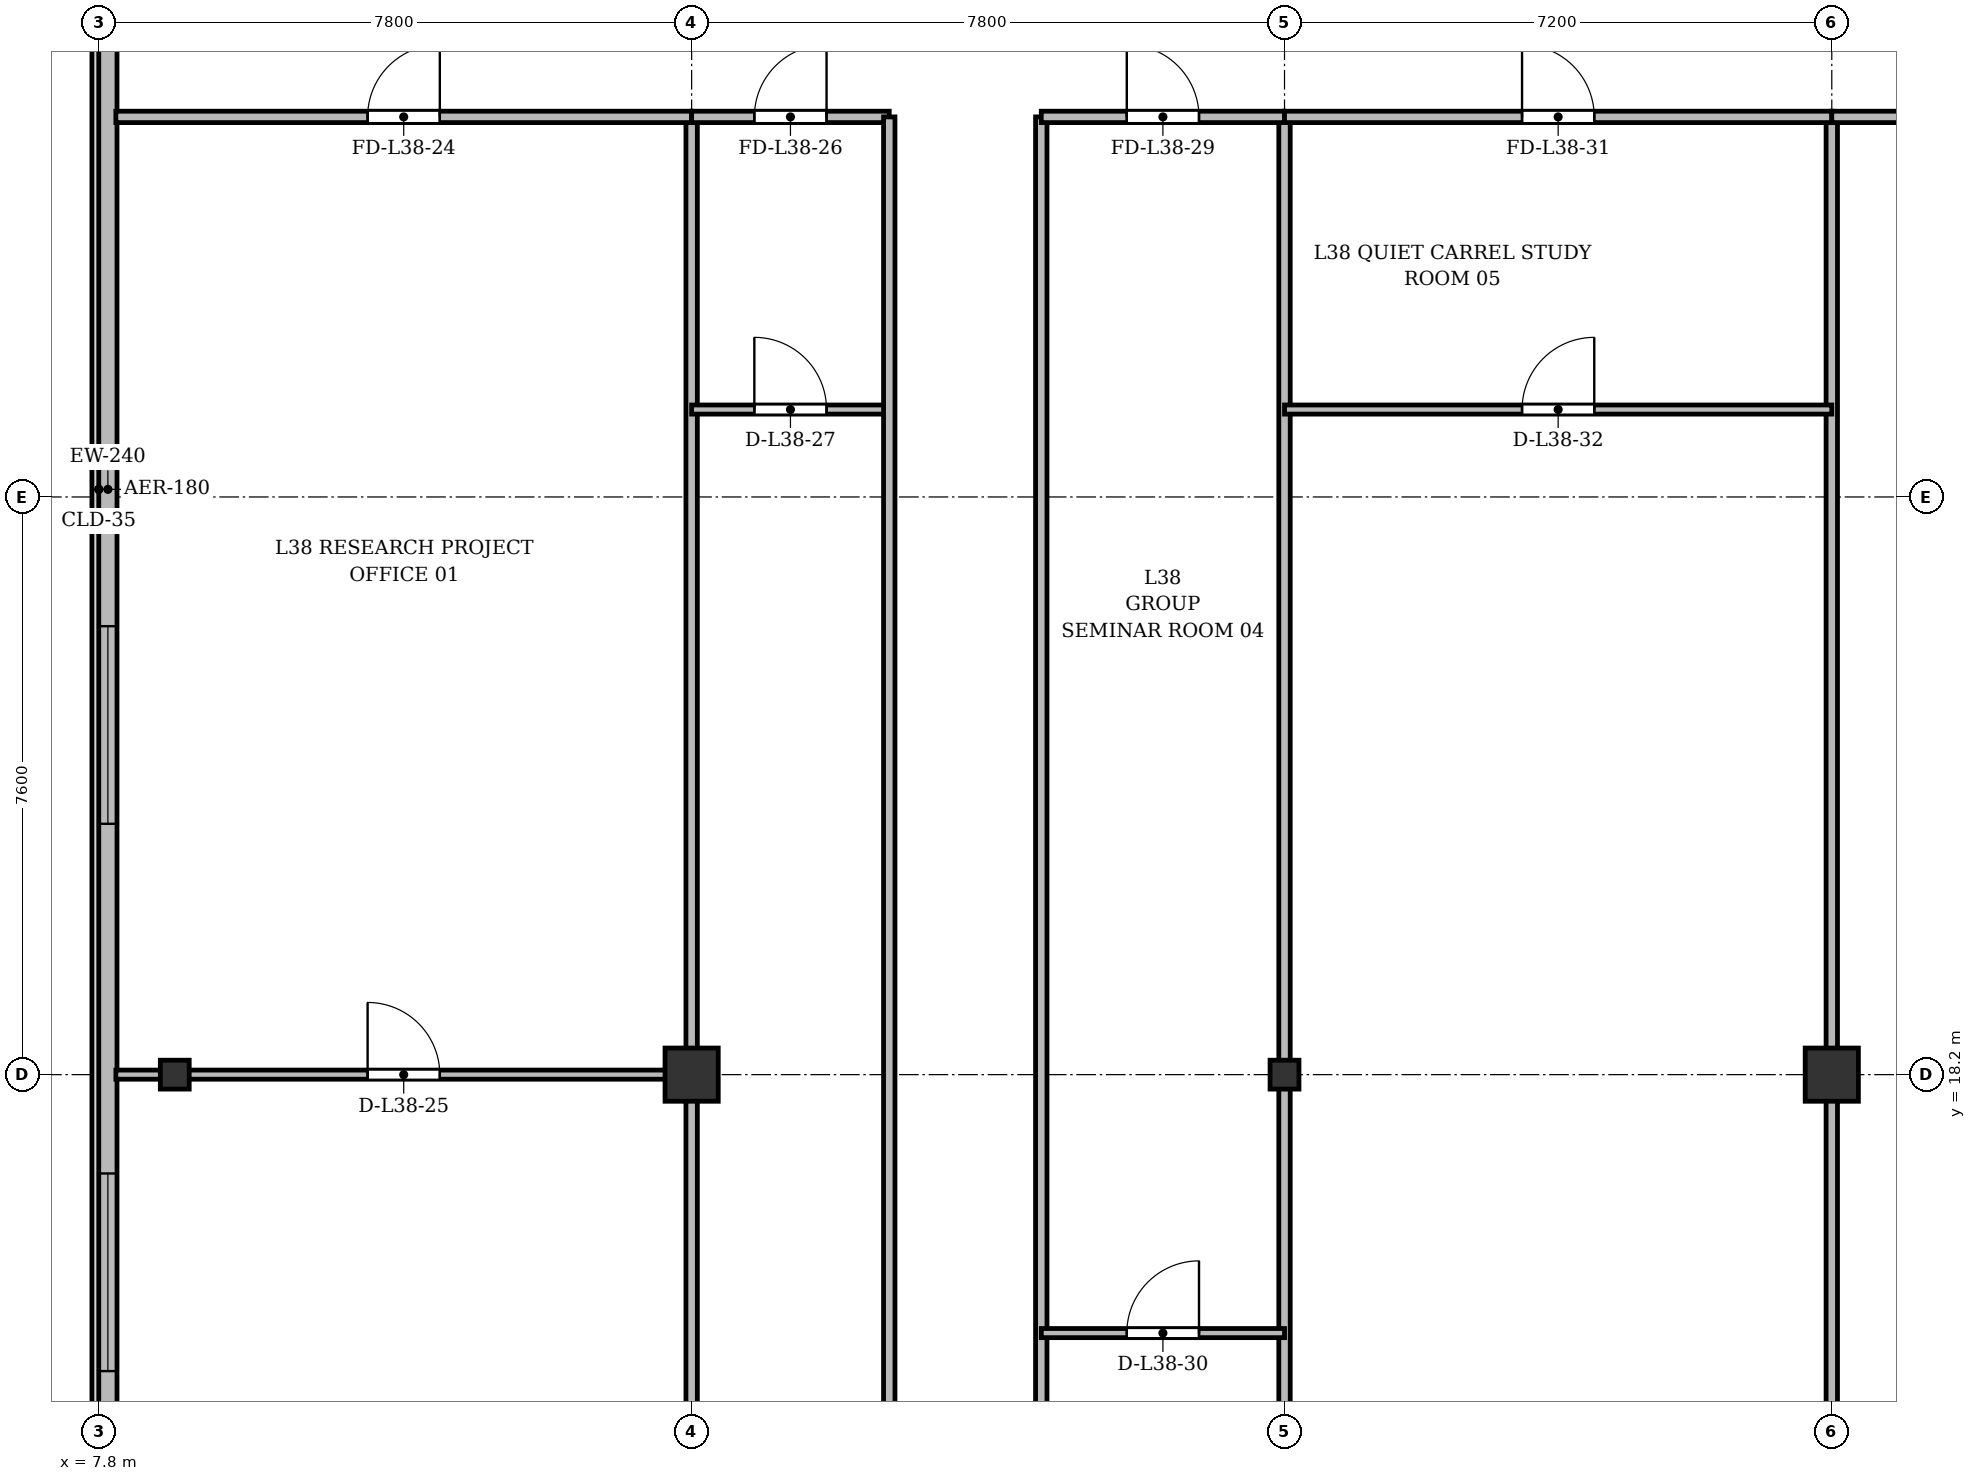
"""IFC4 building model, lengths in metres.
Left out: names, types, materials, properties, quantities, classifications, styles, units other than length and angle.
Written with IfcOpenShell. Run it as: python <this file> out.ifc"""

import sys

from ifc_helpers import new_model, si_unit, direction, frame, frame_2d, origin, origin_2d, place, context, subcontext, project, spatial, rectangle, i_section, extrude, source, transform, mapped, element, fill, save


model = new_model("IFC4")
c1 = context("Model", 3, precision=1e-05, world=origin(), true_north=direction((0.0, 1.0)))
c2 = subcontext(c1, "Body", "Model", "MODEL_VIEW")
j1 = project(units=[si_unit("LENGTHUNIT", "METRE"), si_unit("PLANEANGLEUNIT", "RADIAN")], contexts=[c1])
p1 = place(None, origin())
s1 = spatial("IfcSite", under=j1, at=p1, CompositionType="ELEMENT")
p2 = place(p1, origin())
s2 = spatial("IfcBuilding", under=s1, at=p2, CompositionType="ELEMENT")
p3 = place(p2, frame((0.0, 0.0, 146.5)))
s3 = spatial("IfcBuildingStorey", under=s2, at=p3, CompositionType="ELEMENT", Elevation=146.5)
m1 = source(origin(), c2, "Body", "SweptSolid", [
    extrude(i_section(OverallWidth=0.38, OverallDepth=0.38, WebThickness=0.02, FlangeThickness=0.03, at=origin_2d()), origin(), (0.0, 0.0, 1.0), 3.6),
])
p4 = place(p3, frame((8.8, 18.2, 0.0), z_axis=(0.0, 0.0, 1.0), x_axis=(1.0, 0.0, 0.0)))
e1 = element("IfcColumn", 1, at=p4, inside=s3, PredefinedType="COLUMN", context=c2, shape_type="MappedRepresentation", body=[
    mapped(m1, transform((0.0, 0.0, 0.0), x_axis=(1.0, 0.0, 0.0), y_axis=(0.0, 1.0, 0.0), z_axis=(0.0, 0.0, 1.0), scale=1.0)),
])
m2 = source(origin(), c2, "Body", "SweptSolid", [
    extrude(rectangle(XDim=0.7, YDim=0.7, at=origin_2d()), origin(), (0.0, 0.0, 1.0), 3.6),
])
p5 = place(p3, frame((15.6, 18.2, 0.0), z_axis=(0.0, 0.0, 1.0), x_axis=(1.0, 0.0, 0.0)))
e2 = element("IfcColumn", 2, at=p5, inside=s3, PredefinedType="COLUMN", context=c2, shape_type="MappedRepresentation", body=[
    mapped(m2, transform((0.0, 0.0, 0.0), x_axis=(1.0, 0.0, 0.0), y_axis=(0.0, 1.0, 0.0), z_axis=(0.0, 0.0, 1.0), scale=1.0)),
])
p6 = place(p3, frame((23.4, 18.2, 0.0), z_axis=(0.0, 0.0, 1.0), x_axis=(1.0, 0.0, 0.0)))
e3 = element("IfcColumn", 3, at=p6, inside=s3, PredefinedType="COLUMN", context=c2, shape_type="MappedRepresentation", body=[
    mapped(m1, transform((0.0, 0.0, 0.0), x_axis=(1.0, 0.0, 0.0), y_axis=(0.0, 1.0, 0.0), z_axis=(0.0, 0.0, 1.0), scale=1.0)),
])
p7 = place(p3, frame((30.6, 18.2, 0.0), z_axis=(0.0, 0.0, 1.0), x_axis=(1.0, 0.0, 0.0)))
e4 = element("IfcColumn", 4, at=p7, inside=s3, PredefinedType="COLUMN", context=c2, shape_type="MappedRepresentation", body=[
    mapped(m2, transform((0.0, 0.0, 0.0), x_axis=(1.0, 0.0, 0.0), y_axis=(0.0, 1.0, 0.0), z_axis=(0.0, 0.0, 1.0), scale=1.0)),
])
p8 = place(p3, frame((7.92, 6.3, 0.0), z_axis=(0.0, 0.0, 1.0), x_axis=(0.0, 1.0, 0.0)))
e5 = element("IfcWall", 5, at=p8, inside=s3, PredefinedType="SOLIDWALL", context=c2, shape_type="SweptSolid", body=[
    extrude(rectangle(XDim=39.2, YDim=0.24, at=frame_2d((19.6, 0.0))), origin(), (0.0, 0.0, 1.0), 3.35),
])
p9 = place(p8, frame((1.45, 0.0, 0.92)))
e6 = element("IfcOpeningElement", 6, at=p9, cuts=e5, PredefinedType="OPENING", context=c2, shape_type="SweptSolid", body=[
    extrude(rectangle(XDim=1.2, YDim=1.65, at=frame_2d((0.6, 0.825))), frame((0.0, 0.13, 0.0), z_axis=(0.0, -1.0, 0.0), x_axis=(1.0, 0.0, 0.0)), (0.0, 0.0, 1.0), 0.26),
])
p10 = place(p8, frame((3.8, 0.0, 0.92)))
e7 = element("IfcOpeningElement", 7, at=p10, cuts=e5, PredefinedType="OPENING", context=c2, shape_type="SweptSolid", body=[
    extrude(rectangle(XDim=2.6, YDim=1.9, at=frame_2d((1.3, 0.95))), frame((0.0, 0.13, 0.0), z_axis=(0.0, -1.0, 0.0), x_axis=(1.0, 0.0, 0.0)), (0.0, 0.0, 1.0), 0.26),
])
p11 = place(p8, frame((8.0, 0.0, 0.92)))
e8 = element("IfcOpeningElement", 8, at=p11, cuts=e5, PredefinedType="OPENING", context=c2, shape_type="SweptSolid", body=[
    extrude(rectangle(XDim=2.6, YDim=1.9, at=frame_2d((1.3, 0.95))), frame((0.0, 0.13, 0.0), z_axis=(0.0, -1.0, 0.0), x_axis=(1.0, 0.0, 0.0)), (0.0, 0.0, 1.0), 0.26),
])
p12 = place(p8, frame((15.2, 0.0, 0.92)))
e9 = element("IfcOpeningElement", 9, at=p12, cuts=e5, PredefinedType="OPENING", context=c2, shape_type="SweptSolid", body=[
    extrude(rectangle(XDim=2.6, YDim=1.9, at=frame_2d((1.3, 0.95))), frame((0.0, 0.13, 0.0), z_axis=(0.0, -1.0, 0.0), x_axis=(1.0, 0.0, 0.0)), (0.0, 0.0, 1.0), 0.26),
])
p13 = place(p8, frame((29.2, 0.0, 0.92)))
e10 = element("IfcOpeningElement", 10, at=p13, cuts=e5, PredefinedType="OPENING", context=c2, shape_type="SweptSolid", body=[
    extrude(rectangle(XDim=2.6, YDim=1.9, at=frame_2d((1.3, 0.95))), frame((0.0, 0.13, 0.0), z_axis=(0.0, -1.0, 0.0), x_axis=(1.0, 0.0, 0.0)), (0.0, 0.0, 1.0), 0.26),
])
p14 = place(p8, frame((33.5, 0.0, 0.92)))
e11 = element("IfcOpeningElement", 11, at=p14, cuts=e5, PredefinedType="OPENING", context=c2, shape_type="SweptSolid", body=[
    extrude(rectangle(XDim=1.2, YDim=1.65, at=frame_2d((0.6, 0.825))), frame((0.0, 0.13, 0.0), z_axis=(0.0, -1.0, 0.0), x_axis=(1.0, 0.0, 0.0)), (0.0, 0.0, 1.0), 0.26),
])
p15 = place(p8, frame((36.85, 0.0, 0.92)))
e12 = element("IfcOpeningElement", 12, at=p15, cuts=e5, PredefinedType="OPENING", context=c2, shape_type="SweptSolid", body=[
    extrude(rectangle(XDim=1.2, YDim=1.65, at=frame_2d((0.6, 0.825))), frame((0.0, 0.13, 0.0), z_axis=(0.0, -1.0, 0.0), x_axis=(1.0, 0.0, 0.0)), (0.0, 0.0, 1.0), 0.26),
])
for number, where, z_axis, x_axis in (
    (13, (15.6, 3.525, 0.0), (0.0, 0.0, 1.0), (0.0, 1.0, 0.0)),
    (14, (23.4, 3.525, 0.0), (0.0, 0.0, 1.0), (0.0, 1.0, 0.0)),
    (15, (30.6, 3.525, 0.0), (0.0, 0.0, 1.0), (0.0, 1.0, 0.0)),
):
    element("IfcWall", number, at=place(p3, frame(where, z_axis=z_axis, x_axis=x_axis)), inside=s3, PredefinedType="PARTITIONING", context=c2, shape_type="SweptSolid", body=[
        extrude(rectangle(XDim=27.275, YDim=0.15, at=frame_2d((13.638, 0.0))), origin(), (0.0, 0.0, 1.0), 2.85),
    ])
p16 = place(p3, frame((8.025, 30.8, 0.0), z_axis=(0.0, 0.0, 1.0), x_axis=(1.0, 0.0, 0.0)))
e16 = element("IfcWall", 16, at=p16, inside=s3, PredefinedType="PARTITIONING", context=c2, shape_type="SweptSolid", body=[
    extrude(rectangle(XDim=7.575, YDim=0.15, at=frame_2d((3.788, 0.0))), origin(), (0.0, 0.0, 1.0), 2.85),
])
p17 = place(p16, frame((3.312, 0.0, 0.0)))
e17 = element("IfcOpeningElement", 17, at=p17, cuts=e16, PredefinedType="OPENING", context=c2, shape_type="SweptSolid", body=[
    extrude(rectangle(XDim=0.95, YDim=2.15, at=frame_2d((0.475, 1.075))), frame((0.0, 0.085, 0.0), z_axis=(0.0, -1.0, 0.0), x_axis=(1.0, 0.0, 0.0)), (0.0, 0.0, 1.0), 0.17),
])
p18 = place(p3, frame((8.025, 18.2, 0.0), z_axis=(0.0, 0.0, 1.0), x_axis=(1.0, 0.0, 0.0)))
e18 = element("IfcWall", 18, at=p18, inside=s3, PredefinedType="PARTITIONING", context=c2, shape_type="SweptSolid", body=[
    extrude(rectangle(XDim=7.575, YDim=0.12, at=frame_2d((3.788, 0.0))), origin(), (0.0, 0.0, 1.0), 2.75),
])
p19 = place(p18, frame((3.312, 0.0, 0.0)))
e19 = element("IfcOpeningElement", 19, at=p19, cuts=e18, PredefinedType="OPENING", context=c2, shape_type="SweptSolid", body=[
    extrude(rectangle(XDim=0.95, YDim=2.15, at=frame_2d((0.475, 1.075))), frame((0.0, 0.07, 0.0), z_axis=(0.0, -1.0, 0.0), x_axis=(1.0, 0.0, 0.0)), (0.0, 0.0, 1.0), 0.14),
])
p20 = place(p3, frame((15.6, 30.8, 0.0), z_axis=(0.0, 0.0, 1.0), x_axis=(1.0, 0.0, 0.0)))
e20 = element("IfcWall", 20, at=p20, inside=s3, PredefinedType="PARTITIONING", context=c2, shape_type="SweptSolid", body=[
    extrude(rectangle(XDim=2.6, YDim=0.15, at=frame_2d((1.3, 0.0))), origin(), (0.0, 0.0, 1.0), 2.85),
])
p21 = place(p20, frame((0.825, 0.0, 0.0)))
e21 = element("IfcOpeningElement", 21, at=p21, cuts=e20, PredefinedType="OPENING", context=c2, shape_type="SweptSolid", body=[
    extrude(rectangle(XDim=0.95, YDim=2.15, at=frame_2d((0.475, 1.075))), frame((0.0, 0.085, 0.0), z_axis=(0.0, -1.0, 0.0), x_axis=(1.0, 0.0, 0.0)), (0.0, 0.0, 1.0), 0.17),
])
p22 = place(p3, frame((15.6, 26.95, 0.0), z_axis=(0.0, 0.0, 1.0), x_axis=(1.0, 0.0, 0.0)))
e22 = element("IfcWall", 22, at=p22, inside=s3, PredefinedType="PARTITIONING", context=c2, shape_type="SweptSolid", body=[
    extrude(rectangle(XDim=2.6, YDim=0.12, at=frame_2d((1.3, 0.0))), origin(), (0.0, 0.0, 1.0), 2.85),
])
p23 = place(p22, frame((0.825, 0.0, 0.0)))
e23 = element("IfcOpeningElement", 23, at=p23, cuts=e22, PredefinedType="OPENING", context=c2, shape_type="SweptSolid", body=[
    extrude(rectangle(XDim=0.95, YDim=2.15, at=frame_2d((0.475, 1.075))), frame((0.0, 0.07, 0.0), z_axis=(0.0, -1.0, 0.0), x_axis=(1.0, 0.0, 0.0)), (0.0, 0.0, 1.0), 0.14),
])
for number, where, z_axis, x_axis in (
    (24, (18.2, 3.525, 0.0), (0.0, 0.0, 1.0), (0.0, 1.0, 0.0)),
    (25, (20.2, 3.525, 0.0), (0.0, 0.0, 1.0), (0.0, 1.0, 0.0)),
):
    element("IfcWall", number, at=place(p3, frame(where, z_axis=z_axis, x_axis=x_axis)), inside=s3, PredefinedType="PARTITIONING", context=c2, shape_type="SweptSolid", body=[
        extrude(rectangle(XDim=27.275, YDim=0.15, at=frame_2d((13.638, 0.0))), origin(), (0.0, 0.0, 1.0), 2.75),
    ])
p24 = place(p3, frame((20.2, 30.8, 0.0), z_axis=(0.0, 0.0, 1.0), x_axis=(1.0, 0.0, 0.0)))
e26 = element("IfcWall", 26, at=p24, inside=s3, PredefinedType="PARTITIONING", context=c2, shape_type="SweptSolid", body=[
    extrude(rectangle(XDim=3.2, YDim=0.15, at=frame_2d((1.6, 0.0))), origin(), (0.0, 0.0, 1.0), 2.85),
])
p25 = place(p24, frame((1.125, 0.0, 0.0)))
e27 = element("IfcOpeningElement", 27, at=p25, cuts=e26, PredefinedType="OPENING", context=c2, shape_type="SweptSolid", body=[
    extrude(rectangle(XDim=0.95, YDim=2.15, at=frame_2d((0.475, 1.075))), frame((0.0, 0.085, 0.0), z_axis=(0.0, -1.0, 0.0), x_axis=(1.0, 0.0, 0.0)), (0.0, 0.0, 1.0), 0.17),
])
p26 = place(p3, frame((20.2, 14.8, 0.0), z_axis=(0.0, 0.0, 1.0), x_axis=(1.0, 0.0, 0.0)))
e28 = element("IfcWall", 28, at=p26, inside=s3, PredefinedType="PARTITIONING", context=c2, shape_type="SweptSolid", body=[
    extrude(rectangle(XDim=3.2, YDim=0.12, at=frame_2d((1.6, 0.0))), origin(), (0.0, 0.0, 1.0), 2.85),
])
p27 = place(p26, frame((1.125, 0.0, 0.0)))
e29 = element("IfcOpeningElement", 29, at=p27, cuts=e28, PredefinedType="OPENING", context=c2, shape_type="SweptSolid", body=[
    extrude(rectangle(XDim=0.95, YDim=2.15, at=frame_2d((0.475, 1.075))), frame((0.0, 0.07, 0.0), z_axis=(0.0, -1.0, 0.0), x_axis=(1.0, 0.0, 0.0)), (0.0, 0.0, 1.0), 0.14),
])
p28 = place(p3, frame((23.4, 30.8, 0.0), z_axis=(0.0, 0.0, 1.0), x_axis=(1.0, 0.0, 0.0)))
e30 = element("IfcWall", 30, at=p28, inside=s3, PredefinedType="PARTITIONING", context=c2, shape_type="SweptSolid", body=[
    extrude(rectangle(XDim=7.2, YDim=0.15, at=frame_2d((3.6, 0.0))), origin(), (0.0, 0.0, 1.0), 2.85),
])
p29 = place(p28, frame((3.125, 0.0, 0.0)))
e31 = element("IfcOpeningElement", 31, at=p29, cuts=e30, PredefinedType="OPENING", context=c2, shape_type="SweptSolid", body=[
    extrude(rectangle(XDim=0.95, YDim=2.15, at=frame_2d((0.475, 1.075))), frame((0.0, 0.085, 0.0), z_axis=(0.0, -1.0, 0.0), x_axis=(1.0, 0.0, 0.0)), (0.0, 0.0, 1.0), 0.17),
])
p30 = place(p3, frame((23.4, 26.95, 0.0), z_axis=(0.0, 0.0, 1.0), x_axis=(1.0, 0.0, 0.0)))
e32 = element("IfcWall", 32, at=p30, inside=s3, PredefinedType="PARTITIONING", context=c2, shape_type="SweptSolid", body=[
    extrude(rectangle(XDim=7.2, YDim=0.12, at=frame_2d((3.6, 0.0))), origin(), (0.0, 0.0, 1.0), 2.85),
])
p31 = place(p30, frame((3.125, 0.0, 0.0)))
e33 = element("IfcOpeningElement", 33, at=p31, cuts=e32, PredefinedType="OPENING", context=c2, shape_type="SweptSolid", body=[
    extrude(rectangle(XDim=0.95, YDim=2.15, at=frame_2d((0.475, 1.075))), frame((0.0, 0.07, 0.0), z_axis=(0.0, -1.0, 0.0), x_axis=(1.0, 0.0, 0.0)), (0.0, 0.0, 1.0), 0.14),
])
p32 = place(p3, frame((30.6, 30.8, 0.0), z_axis=(0.0, 0.0, 1.0), x_axis=(1.0, 0.0, 0.0)))
e34 = element("IfcWall", 34, at=p32, inside=s3, PredefinedType="PARTITIONING", context=c2, shape_type="SweptSolid", body=[
    extrude(rectangle(XDim=13.2, YDim=0.15, at=frame_2d((6.6, 0.0))), origin(), (0.0, 0.0, 1.0), 2.85),
])
p33 = place(p32, frame((5.8, 0.0, 0.0)))
e35 = element("IfcOpeningElement", 35, at=p33, cuts=e34, PredefinedType="OPENING", context=c2, shape_type="SweptSolid", body=[
    extrude(rectangle(XDim=1.6, YDim=2.2, at=frame_2d((0.8, 1.1))), frame((0.0, 0.085, 0.0), z_axis=(0.0, -1.0, 0.0), x_axis=(1.0, 0.0, 0.0)), (0.0, 0.0, 1.0), 0.17),
])
m3 = source(origin(), c2, "Body", "SweptSolid", [
    extrude(rectangle(XDim=2.6, YDim=1.9, at=frame_2d((1.3, 0.95))), frame((0.0, 0.03, 0.0), z_axis=(0.0, -1.0, 0.0), x_axis=(1.0, 0.0, 0.0)), (0.0, 0.0, 1.0), 0.06),
])
p34 = place(p11, origin())
e36 = element("IfcWindow", 36, at=p34, inside=s3, PartitioningType="SINGLE_PANEL", PredefinedType="WINDOW", context=c2, shape_type="MappedRepresentation", body=[
    mapped(m3, transform((0.0, 0.0, 0.0), x_axis=(1.0, 0.0, 0.0), y_axis=(0.0, 1.0, 0.0), z_axis=(0.0, 0.0, 1.0), scale=1.0)),
])
fill(e8, e36)
p35 = place(p12, origin())
e37 = element("IfcWindow", 37, at=p35, inside=s3, PartitioningType="SINGLE_PANEL", PredefinedType="WINDOW", context=c2, shape_type="MappedRepresentation", body=[
    mapped(m3, transform((0.0, 0.0, 0.0), x_axis=(1.0, 0.0, 0.0), y_axis=(0.0, 1.0, 0.0), z_axis=(0.0, 0.0, 1.0), scale=1.0)),
])
fill(e9, e37)
m4 = source(origin(), c2, "Body", "SweptSolid", [
    extrude(rectangle(XDim=0.95, YDim=2.15, at=frame_2d((0.475, 1.075))), frame((0.0, 0.025, 0.0), z_axis=(0.0, -1.0, 0.0), x_axis=(1.0, 0.0, 0.0)), (0.0, 0.0, 1.0), 0.05),
])
p36 = place(p17, origin())
e38 = element("IfcDoor", 38, at=p36, inside=s3, OperationType="SINGLE_SWING_RIGHT", PredefinedType="DOOR", context=c2, shape_type="MappedRepresentation", body=[
    mapped(m4, transform((0.0, 0.0, 0.0), x_axis=(1.0, 0.0, 0.0), y_axis=(0.0, 1.0, 0.0), z_axis=(0.0, 0.0, 1.0), scale=1.0)),
])
fill(e17, e38)
p37 = place(p19, origin())
e39 = element("IfcDoor", 39, at=p37, inside=s3, OperationType="SINGLE_SWING_LEFT", PredefinedType="DOOR", context=c2, shape_type="MappedRepresentation", body=[
    mapped(m4, transform((0.0, 0.0, 0.0), x_axis=(1.0, 0.0, 0.0), y_axis=(0.0, 1.0, 0.0), z_axis=(0.0, 0.0, 1.0), scale=1.0)),
])
fill(e19, e39)
p38 = place(p21, origin())
e40 = element("IfcDoor", 40, at=p38, inside=s3, OperationType="SINGLE_SWING_RIGHT", PredefinedType="DOOR", context=c2, shape_type="MappedRepresentation", body=[
    mapped(m4, transform((0.0, 0.0, 0.0), x_axis=(1.0, 0.0, 0.0), y_axis=(0.0, 1.0, 0.0), z_axis=(0.0, 0.0, 1.0), scale=1.0)),
])
fill(e21, e40)
p39 = place(p23, origin())
e41 = element("IfcDoor", 41, at=p39, inside=s3, OperationType="SINGLE_SWING_LEFT", PredefinedType="DOOR", context=c2, shape_type="MappedRepresentation", body=[
    mapped(m4, transform((0.0, 0.0, 0.0), x_axis=(1.0, 0.0, 0.0), y_axis=(0.0, 1.0, 0.0), z_axis=(0.0, 0.0, 1.0), scale=1.0)),
])
fill(e23, e41)
p40 = place(p25, origin())
e42 = element("IfcDoor", 42, at=p40, inside=s3, OperationType="SINGLE_SWING_LEFT", PredefinedType="DOOR", context=c2, shape_type="MappedRepresentation", body=[
    mapped(m4, transform((0.0, 0.0, 0.0), x_axis=(1.0, 0.0, 0.0), y_axis=(0.0, 1.0, 0.0), z_axis=(0.0, 0.0, 1.0), scale=1.0)),
])
fill(e27, e42)
p41 = place(p27, origin())
e43 = element("IfcDoor", 43, at=p41, inside=s3, OperationType="SINGLE_SWING_RIGHT", PredefinedType="DOOR", context=c2, shape_type="MappedRepresentation", body=[
    mapped(m4, transform((0.0, 0.0, 0.0), x_axis=(1.0, 0.0, 0.0), y_axis=(0.0, 1.0, 0.0), z_axis=(0.0, 0.0, 1.0), scale=1.0)),
])
fill(e29, e43)
p42 = place(p29, origin())
e44 = element("IfcDoor", 44, at=p42, inside=s3, OperationType="SINGLE_SWING_LEFT", PredefinedType="DOOR", context=c2, shape_type="MappedRepresentation", body=[
    mapped(m4, transform((0.0, 0.0, 0.0), x_axis=(1.0, 0.0, 0.0), y_axis=(0.0, 1.0, 0.0), z_axis=(0.0, 0.0, 1.0), scale=1.0)),
])
fill(e31, e44)
p43 = place(p31, origin())
e45 = element("IfcDoor", 45, at=p43, inside=s3, OperationType="SINGLE_SWING_RIGHT", PredefinedType="DOOR", context=c2, shape_type="MappedRepresentation", body=[
    mapped(m4, transform((0.0, 0.0, 0.0), x_axis=(1.0, 0.0, 0.0), y_axis=(0.0, 1.0, 0.0), z_axis=(0.0, 0.0, 1.0), scale=1.0)),
])
fill(e33, e45)
save(model, sys.argv[1])
